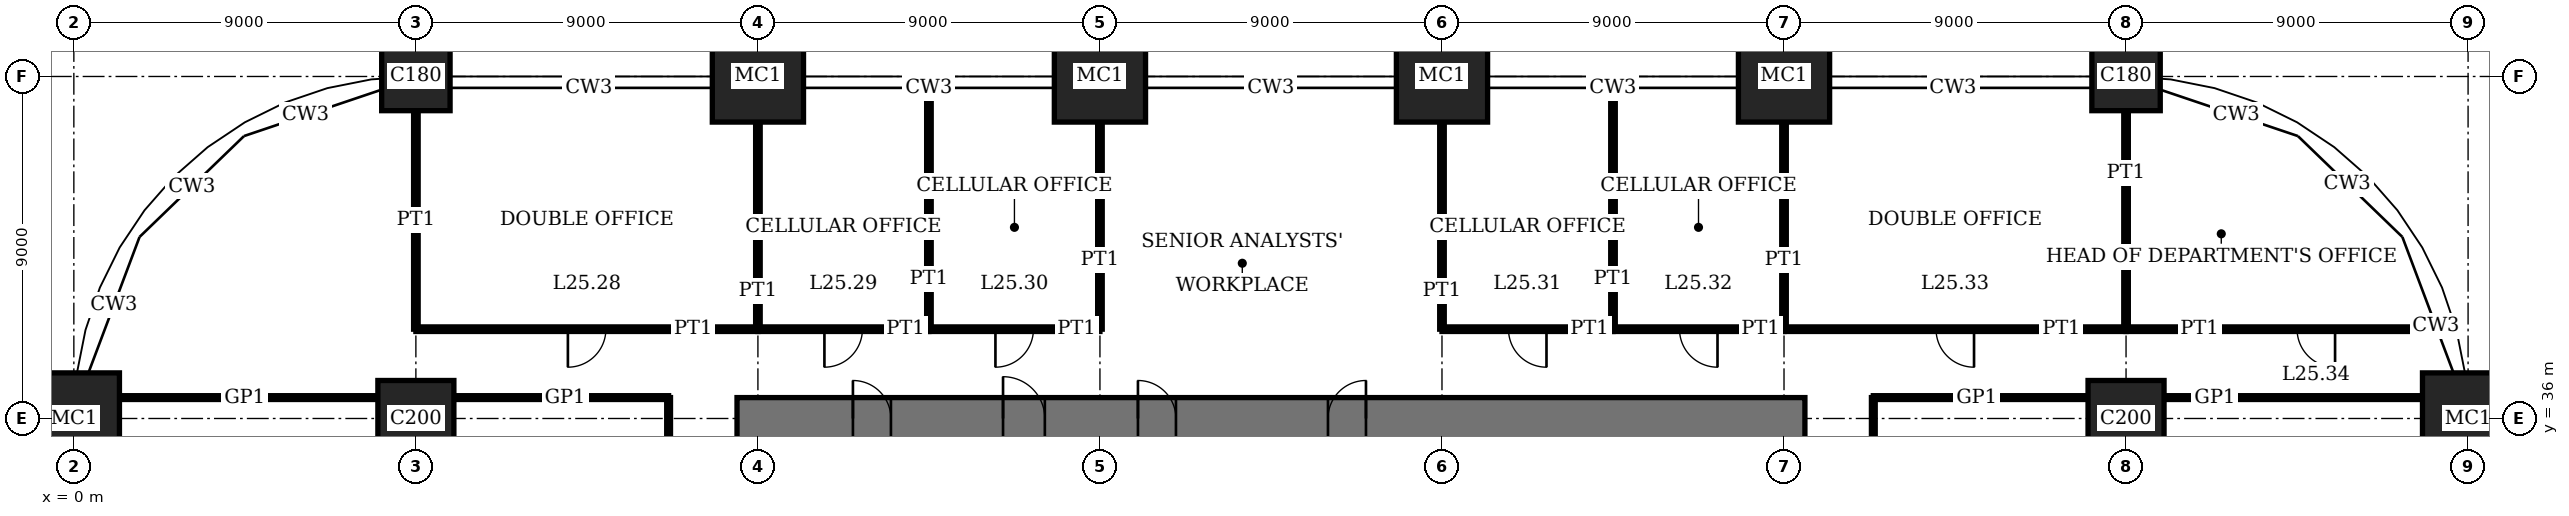
"""IFC4 building model, lengths in metres.
Left out: names, types, materials, properties, quantities, classifications, styles, units other than length and angle.
Written with IfcOpenShell. Run it as: python <this file> out.ifc"""

import sys

from ifc_helpers import new_model, si_unit, direction, frame, frame_2d, origin, origin_2d, place, context, subcontext, project, spatial, rectangle, extrude, element, fill, save


model = new_model("IFC4")
c1 = context("Model", 3, precision=1e-05, world=origin(), true_north=direction((0.0, 1.0)))
c2 = subcontext(c1, "Body", "Model", "MODEL_VIEW")
j1 = project(units=[si_unit("LENGTHUNIT", "METRE"), si_unit("PLANEANGLEUNIT", "RADIAN")], contexts=[c1])
p1 = place(None, origin())
s1 = spatial("IfcSite", under=j1, at=p1, CompositionType="ELEMENT")
p2 = place(p1, origin())
s2 = spatial("IfcBuilding", under=s1, at=p2, CompositionType="ELEMENT")
p3 = place(p2, frame((0.0, 0.0, 105.0)))
s3 = spatial("IfcBuildingStorey", under=s2, at=p3, CompositionType="ELEMENT", Elevation=105.0)
p4 = place(p3, frame((0.0, 36.0, 0.0), z_axis=(0.0, 0.0, 1.0), x_axis=(1.0, 0.0, 0.0)))
e1 = element("IfcColumn", 1, at=p4, inside=s3, PredefinedType="COLUMN", context=c2, shape_type="SweptSolid", body=[
    extrude(rectangle(XDim=2.4, YDim=2.4, at=origin_2d()), origin(), (0.0, 0.0, 1.0), 4.0),
])
p5 = place(p3, frame((9.0, 36.0, 0.0), z_axis=(0.0, 0.0, 1.0), x_axis=(1.0, 0.0, 0.0)))
e2 = element("IfcColumn", 2, at=p5, inside=s3, PredefinedType="COLUMN", context=c2, shape_type="SweptSolid", body=[
    extrude(rectangle(XDim=2.0, YDim=2.0, at=origin_2d()), origin(), (0.0, 0.0, 1.0), 4.0),
])
p6 = place(p3, frame((9.0, 45.0, 0.0), z_axis=(0.0, 0.0, 1.0), x_axis=(1.0, 0.0, 0.0)))
e3 = element("IfcColumn", 3, at=p6, inside=s3, PredefinedType="COLUMN", context=c2, shape_type="SweptSolid", body=[
    extrude(rectangle(XDim=1.8, YDim=1.8, at=origin_2d()), origin(), (0.0, 0.0, 1.0), 4.0),
])
for number, where, z_axis, x_axis in (
    (4, (18.0, 45.0, 0.0), (0.0, 0.0, 1.0), (1.0, 0.0, 0.0)),
    (5, (27.0, 45.0, 0.0), (0.0, 0.0, 1.0), (1.0, 0.0, 0.0)),
    (6, (36.0, 45.0, 0.0), (0.0, 0.0, 1.0), (1.0, 0.0, 0.0)),
    (7, (45.0, 45.0, 0.0), (0.0, 0.0, 1.0), (1.0, 0.0, 0.0)),
):
    element("IfcColumn", number, at=place(p3, frame(where, z_axis=z_axis, x_axis=x_axis)), inside=s3, PredefinedType="COLUMN", context=c2, shape_type="SweptSolid", body=[
        extrude(rectangle(XDim=2.4, YDim=2.4, at=origin_2d()), origin(), (0.0, 0.0, 1.0), 4.0),
    ])
p7 = place(p3, frame((54.0, 36.0, 0.0), z_axis=(0.0, 0.0, 1.0), x_axis=(1.0, 0.0, 0.0)))
e8 = element("IfcColumn", 8, at=p7, inside=s3, PredefinedType="COLUMN", context=c2, shape_type="SweptSolid", body=[
    extrude(rectangle(XDim=2.0, YDim=2.0, at=origin_2d()), origin(), (0.0, 0.0, 1.0), 4.0),
])
p8 = place(p3, frame((54.0, 45.0, 0.0), z_axis=(0.0, 0.0, 1.0), x_axis=(1.0, 0.0, 0.0)))
e9 = element("IfcColumn", 9, at=p8, inside=s3, PredefinedType="COLUMN", context=c2, shape_type="SweptSolid", body=[
    extrude(rectangle(XDim=1.8, YDim=1.8, at=origin_2d()), origin(), (0.0, 0.0, 1.0), 4.0),
])
p9 = place(p3, frame((63.0, 36.0, 0.0), z_axis=(0.0, 0.0, 1.0), x_axis=(1.0, 0.0, 0.0)))
e10 = element("IfcColumn", 10, at=p9, inside=s3, PredefinedType="COLUMN", context=c2, shape_type="SweptSolid", body=[
    extrude(rectangle(XDim=2.4, YDim=2.4, at=origin_2d()), origin(), (0.0, 0.0, 1.0), 4.0),
])
p10 = place(p3, frame((45.55, 36.0, 0.0), z_axis=(0.0, 0.0, 1.0), x_axis=(-1.0, 0.0, 0.0)))
e11 = element("IfcWall", 11, at=p10, inside=s3, PredefinedType="SHEAR", context=c2, shape_type="SweptSolid", body=[
    extrude(rectangle(XDim=28.1, YDim=1.1, at=frame_2d((14.05, 0.0))), origin(), (0.0, 0.0, 1.0), 4.0),
])
p11 = place(p10, frame((11.55, 0.0, 0.0)))
e12 = element("IfcOpeningElement", 12, at=p11, cuts=e11, PredefinedType="OPENING", context=c2, shape_type="SweptSolid", body=[
    extrude(rectangle(XDim=1.0, YDim=2.4, at=frame_2d((0.5, 1.2))), frame((0.0, 0.56, 0.0), z_axis=(0.0, -1.0, 0.0), x_axis=(1.0, 0.0, 0.0)), (0.0, 0.0, 1.0), 1.12),
])
p12 = place(p10, frame((16.55, 0.0, 0.0)))
e13 = element("IfcOpeningElement", 13, at=p12, cuts=e11, PredefinedType="OPENING", context=c2, shape_type="SweptSolid", body=[
    extrude(rectangle(XDim=1.0, YDim=2.4, at=frame_2d((0.5, 1.2))), frame((0.0, 0.56, 0.0), z_axis=(0.0, -1.0, 0.0), x_axis=(1.0, 0.0, 0.0)), (0.0, 0.0, 1.0), 1.12),
])
p13 = place(p10, frame((20.0, 0.0, 0.0)))
e14 = element("IfcOpeningElement", 14, at=p13, cuts=e11, PredefinedType="OPENING", context=c2, shape_type="SweptSolid", body=[
    extrude(rectangle(XDim=1.1, YDim=2.4, at=frame_2d((0.55, 1.2))), frame((0.0, 0.56, 0.0), z_axis=(0.0, -1.0, 0.0), x_axis=(1.0, 0.0, 0.0)), (0.0, 0.0, 1.0), 1.12),
])
p14 = place(p10, frame((24.05, 0.0, 0.0)))
e15 = element("IfcOpeningElement", 15, at=p14, cuts=e11, PredefinedType="OPENING", context=c2, shape_type="SweptSolid", body=[
    extrude(rectangle(XDim=1.0, YDim=2.4, at=frame_2d((0.5, 1.2))), frame((0.0, 0.56, 0.0), z_axis=(0.0, -1.0, 0.0), x_axis=(1.0, 0.0, 0.0)), (0.0, 0.0, 1.0), 1.12),
])
p15 = place(p3, frame((1.2, 36.55, 0.0), z_axis=(0.0, 0.0, 1.0), x_axis=(1.0, 0.0, 0.0)))
e16 = element("IfcWall", 16, at=p15, inside=s3, PredefinedType="PARTITIONING", context=c2, shape_type="SweptSolid", body=[
    extrude(rectangle(XDim=6.8, YDim=0.1, at=frame_2d((3.4, 0.0))), origin(), (0.0, 0.0, 1.0), 3.75),
])
for number, where, z_axis, x_axis in (
    (17, (10.0, 36.55, 0.0), (0.0, 0.0, 1.0), (1.0, 0.0, 0.0)),
    (18, (47.35, 36.55, 0.0), (0.0, 0.0, 1.0), (1.0, 0.0, 0.0)),
):
    element("IfcWall", number, at=place(p3, frame(where, z_axis=z_axis, x_axis=x_axis)), inside=s3, PredefinedType="PARTITIONING", context=c2, shape_type="SweptSolid", body=[
        extrude(rectangle(XDim=5.65, YDim=0.1, at=frame_2d((2.825, 0.0))), origin(), (0.0, 0.0, 1.0), 3.75),
    ])
p16 = place(p3, frame((55.0, 36.55, 0.0), z_axis=(0.0, 0.0, 1.0), x_axis=(1.0, 0.0, 0.0)))
e19 = element("IfcWall", 19, at=p16, inside=s3, PredefinedType="PARTITIONING", context=c2, shape_type="SweptSolid", body=[
    extrude(rectangle(XDim=6.8, YDim=0.1, at=frame_2d((3.4, 0.0))), origin(), (0.0, 0.0, 1.0), 3.75),
])
p17 = place(p3, frame((9.0, 38.35, 0.0), z_axis=(0.0, 0.0, 1.0), x_axis=(1.0, 0.0, 0.0)))
e20 = element("IfcWall", 20, at=p17, inside=s3, PredefinedType="PARTITIONING", context=c2, shape_type="SweptSolid", body=[
    extrude(rectangle(XDim=9.0, YDim=0.12, at=frame_2d((4.5, 0.0))), origin(), (0.0, 0.0, 1.0), 3.75),
])
p18 = place(p17, frame((4.0, 0.0, 0.0)))
e21 = element("IfcOpeningElement", 21, at=p18, cuts=e20, PredefinedType="OPENING", context=c2, shape_type="SweptSolid", body=[
    extrude(rectangle(XDim=1.0, YDim=2.4, at=frame_2d((0.5, 1.2))), frame((0.0, 0.07, 0.0), z_axis=(0.0, -1.0, 0.0), x_axis=(1.0, 0.0, 0.0)), (0.0, 0.0, 1.0), 0.14),
])
p19 = place(p3, frame((18.0, 38.35, 0.0), z_axis=(0.0, 0.0, 1.0), x_axis=(1.0, 0.0, 0.0)))
e22 = element("IfcWall", 22, at=p19, inside=s3, PredefinedType="PARTITIONING", context=c2, shape_type="SweptSolid", body=[
    extrude(rectangle(XDim=4.5, YDim=0.12, at=frame_2d((2.25, 0.0))), origin(), (0.0, 0.0, 1.0), 3.75),
])
p20 = place(p19, frame((1.75, 0.0, 0.0)))
e23 = element("IfcOpeningElement", 23, at=p20, cuts=e22, PredefinedType="OPENING", context=c2, shape_type="SweptSolid", body=[
    extrude(rectangle(XDim=1.0, YDim=2.4, at=frame_2d((0.5, 1.2))), frame((0.0, 0.07, 0.0), z_axis=(0.0, -1.0, 0.0), x_axis=(1.0, 0.0, 0.0)), (0.0, 0.0, 1.0), 0.14),
])
p21 = place(p3, frame((22.5, 38.35, 0.0), z_axis=(0.0, 0.0, 1.0), x_axis=(1.0, 0.0, 0.0)))
e24 = element("IfcWall", 24, at=p21, inside=s3, PredefinedType="PARTITIONING", context=c2, shape_type="SweptSolid", body=[
    extrude(rectangle(XDim=4.5, YDim=0.12, at=frame_2d((2.25, 0.0))), origin(), (0.0, 0.0, 1.0), 3.75),
])
p22 = place(p21, frame((1.75, 0.0, 0.0)))
e25 = element("IfcOpeningElement", 25, at=p22, cuts=e24, PredefinedType="OPENING", context=c2, shape_type="SweptSolid", body=[
    extrude(rectangle(XDim=1.0, YDim=2.4, at=frame_2d((0.5, 1.2))), frame((0.0, 0.07, 0.0), z_axis=(0.0, -1.0, 0.0), x_axis=(1.0, 0.0, 0.0)), (0.0, 0.0, 1.0), 0.14),
])
p23 = place(p3, frame((36.0, 38.35, 0.0), z_axis=(0.0, 0.0, 1.0), x_axis=(1.0, 0.0, 0.0)))
e26 = element("IfcWall", 26, at=p23, inside=s3, PredefinedType="PARTITIONING", context=c2, shape_type="SweptSolid", body=[
    extrude(rectangle(XDim=4.5, YDim=0.12, at=frame_2d((2.25, 0.0))), origin(), (0.0, 0.0, 1.0), 3.75),
])
p24 = place(p23, frame((1.75, 0.0, 0.0)))
e27 = element("IfcOpeningElement", 27, at=p24, cuts=e26, PredefinedType="OPENING", context=c2, shape_type="SweptSolid", body=[
    extrude(rectangle(XDim=1.0, YDim=2.4, at=frame_2d((0.5, 1.2))), frame((0.0, 0.07, 0.0), z_axis=(0.0, -1.0, 0.0), x_axis=(1.0, 0.0, 0.0)), (0.0, 0.0, 1.0), 0.14),
])
p25 = place(p3, frame((40.5, 38.35, 0.0), z_axis=(0.0, 0.0, 1.0), x_axis=(1.0, 0.0, 0.0)))
e28 = element("IfcWall", 28, at=p25, inside=s3, PredefinedType="PARTITIONING", context=c2, shape_type="SweptSolid", body=[
    extrude(rectangle(XDim=4.5, YDim=0.12, at=frame_2d((2.25, 0.0))), origin(), (0.0, 0.0, 1.0), 3.75),
])
p26 = place(p25, frame((1.75, 0.0, 0.0)))
e29 = element("IfcOpeningElement", 29, at=p26, cuts=e28, PredefinedType="OPENING", context=c2, shape_type="SweptSolid", body=[
    extrude(rectangle(XDim=1.0, YDim=2.4, at=frame_2d((0.5, 1.2))), frame((0.0, 0.07, 0.0), z_axis=(0.0, -1.0, 0.0), x_axis=(1.0, 0.0, 0.0)), (0.0, 0.0, 1.0), 0.14),
])
p27 = place(p3, frame((45.0, 38.35, 0.0), z_axis=(0.0, 0.0, 1.0), x_axis=(1.0, 0.0, 0.0)))
e30 = element("IfcWall", 30, at=p27, inside=s3, PredefinedType="PARTITIONING", context=c2, shape_type="SweptSolid", body=[
    extrude(rectangle(XDim=9.0, YDim=0.12, at=frame_2d((4.5, 0.0))), origin(), (0.0, 0.0, 1.0), 3.75),
])
p28 = place(p27, frame((4.0, 0.0, 0.0)))
e31 = element("IfcOpeningElement", 31, at=p28, cuts=e30, PredefinedType="OPENING", context=c2, shape_type="SweptSolid", body=[
    extrude(rectangle(XDim=1.0, YDim=2.4, at=frame_2d((0.5, 1.2))), frame((0.0, 0.07, 0.0), z_axis=(0.0, -1.0, 0.0), x_axis=(1.0, 0.0, 0.0)), (0.0, 0.0, 1.0), 0.14),
])
p29 = place(p3, frame((54.0, 38.35, 0.0), z_axis=(0.0, 0.0, 1.0), x_axis=(1.0, 0.0, 0.0)))
e32 = element("IfcWall", 32, at=p29, inside=s3, PredefinedType="PARTITIONING", context=c2, shape_type="SweptSolid", body=[
    extrude(rectangle(XDim=8.145, YDim=0.12, at=frame_2d((4.072, 0.0))), origin(), (0.0, 0.0, 1.0), 3.75),
])
p30 = place(p29, frame((4.5, 0.0, 0.0)))
e33 = element("IfcOpeningElement", 33, at=p30, cuts=e32, PredefinedType="OPENING", context=c2, shape_type="SweptSolid", body=[
    extrude(rectangle(XDim=1.0, YDim=2.4, at=frame_2d((0.5, 1.2))), frame((0.0, 0.07, 0.0), z_axis=(0.0, -1.0, 0.0), x_axis=(1.0, 0.0, 0.0)), (0.0, 0.0, 1.0), 0.14),
])
p31 = place(p3, frame((9.0, 38.35, 0.0), z_axis=(0.0, 0.0, 1.0), x_axis=(0.0, 1.0, 0.0)))
e34 = element("IfcWall", 34, at=p31, inside=s3, PredefinedType="PARTITIONING", context=c2, shape_type="SweptSolid", body=[
    extrude(rectangle(XDim=5.75, YDim=0.12, at=frame_2d((2.875, 0.0))), origin(), (0.0, 0.0, 1.0), 3.05),
])
p32 = place(p3, frame((15.65, 27.0, 0.0), z_axis=(0.0, 0.0, 1.0), x_axis=(0.0, 1.0, 0.0)))
e35 = element("IfcWall", 35, at=p32, inside=s3, PredefinedType="PARTITIONING", context=c2, shape_type="SweptSolid", body=[
    extrude(rectangle(XDim=9.55, YDim=0.1, at=frame_2d((4.775, 0.0))), origin(), (0.0, 0.0, 1.0), 3.75),
])
p33 = place(p32, frame((4.275, 0.0, 0.0)))
e36 = element("IfcOpeningElement", 36, at=p33, cuts=e35, PredefinedType="OPENING", context=c2, shape_type="SweptSolid", body=[
    extrude(rectangle(XDim=1.0, YDim=2.4, at=frame_2d((0.5, 1.2))), frame((0.0, 0.06, 0.0), z_axis=(0.0, -1.0, 0.0), x_axis=(1.0, 0.0, 0.0)), (0.0, 0.0, 1.0), 0.12),
])
p34 = place(p3, frame((18.0, 38.35, 0.0), z_axis=(0.0, 0.0, 1.0), x_axis=(0.0, 1.0, 0.0)))
e37 = element("IfcWall", 37, at=p34, inside=s3, PredefinedType="PARTITIONING", context=c2, shape_type="SweptSolid", body=[
    extrude(rectangle(XDim=5.45, YDim=0.12, at=frame_2d((2.725, 0.0))), origin(), (0.0, 0.0, 1.0), 3.05),
])
p35 = place(p3, frame((22.5, 38.35, 0.0), z_axis=(0.0, 0.0, 1.0), x_axis=(0.0, 1.0, 0.0)))
e38 = element("IfcWall", 38, at=p35, inside=s3, PredefinedType="PARTITIONING", context=c2, shape_type="SweptSolid", body=[
    extrude(rectangle(XDim=6.34, YDim=0.12, at=frame_2d((3.17, 0.0))), origin(), (0.0, 0.0, 1.0), 3.75),
])
for number, where, z_axis, x_axis in (
    (39, (27.0, 38.35, 0.0), (0.0, 0.0, 1.0), (0.0, 1.0, 0.0)),
    (40, (36.0, 38.35, 0.0), (0.0, 0.0, 1.0), (0.0, 1.0, 0.0)),
):
    element("IfcWall", number, at=place(p3, frame(where, z_axis=z_axis, x_axis=x_axis)), inside=s3, PredefinedType="PARTITIONING", context=c2, shape_type="SweptSolid", body=[
        extrude(rectangle(XDim=5.45, YDim=0.12, at=frame_2d((2.725, 0.0))), origin(), (0.0, 0.0, 1.0), 3.05),
    ])
p36 = place(p3, frame((40.5, 38.35, 0.0), z_axis=(0.0, 0.0, 1.0), x_axis=(0.0, 1.0, 0.0)))
e41 = element("IfcWall", 41, at=p36, inside=s3, PredefinedType="PARTITIONING", context=c2, shape_type="SweptSolid", body=[
    extrude(rectangle(XDim=6.34, YDim=0.12, at=frame_2d((3.17, 0.0))), origin(), (0.0, 0.0, 1.0), 3.75),
])
p37 = place(p3, frame((45.0, 38.35, 0.0), z_axis=(0.0, 0.0, 1.0), x_axis=(0.0, 1.0, 0.0)))
e42 = element("IfcWall", 42, at=p37, inside=s3, PredefinedType="PARTITIONING", context=c2, shape_type="SweptSolid", body=[
    extrude(rectangle(XDim=5.45, YDim=0.12, at=frame_2d((2.725, 0.0))), origin(), (0.0, 0.0, 1.0), 3.05),
])
p38 = place(p3, frame((47.35, 31.5, 0.0), z_axis=(0.0, 0.0, 1.0), x_axis=(0.0, 1.0, 0.0)))
e43 = element("IfcWall", 43, at=p38, inside=s3, PredefinedType="PARTITIONING", context=c2, shape_type="SweptSolid", body=[
    extrude(rectangle(XDim=5.05, YDim=0.1, at=frame_2d((2.525, 0.0))), origin(), (0.0, 0.0, 1.0), 3.75),
])
p39 = place(p3, frame((54.0, 38.35, 0.0), z_axis=(0.0, 0.0, 1.0), x_axis=(0.0, 1.0, 0.0)))
e44 = element("IfcWall", 44, at=p39, inside=s3, PredefinedType="PARTITIONING", context=c2, shape_type="SweptSolid", body=[
    extrude(rectangle(XDim=5.75, YDim=0.12, at=frame_2d((2.875, 0.0))), origin(), (0.0, 0.0, 1.0), 3.05),
])
p40 = place(p11, origin())
e45 = element("IfcDoor", 45, at=p40, inside=s3, OperationType="SINGLE_SWING_LEFT", PredefinedType="DOOR", context=c2, shape_type="SweptSolid", body=[
    extrude(rectangle(XDim=1.0, YDim=2.4, at=frame_2d((0.5, 1.2))), frame((0.0, 0.025, 0.0), z_axis=(0.0, -1.0, 0.0), x_axis=(1.0, 0.0, 0.0)), (0.0, 0.0, 1.0), 0.05),
    extrude(rectangle(XDim=0.04, YDim=2.4, at=frame_2d((0.02, 1.2))), frame((0.0, 0.4, 0.0), z_axis=(0.0, -1.0, 0.0), x_axis=(1.0, 0.0, 0.0)), (0.0, 0.0, 1.0), 0.8),
    extrude(rectangle(XDim=0.04, YDim=2.4, at=frame_2d((0.98, 1.2))), frame((0.0, 0.4, 0.0), z_axis=(0.0, -1.0, 0.0), x_axis=(1.0, 0.0, 0.0)), (0.0, 0.0, 1.0), 0.8),
    extrude(rectangle(XDim=1.0, YDim=0.04, at=frame_2d((0.5, 2.38))), frame((0.0, 0.4, 0.0), z_axis=(0.0, -1.0, 0.0), x_axis=(1.0, 0.0, 0.0)), (0.0, 0.0, 1.0), 0.8),
])
fill(e12, e45)
p41 = place(p12, origin())
e46 = element("IfcDoor", 46, at=p41, inside=s3, OperationType="SINGLE_SWING_RIGHT", PredefinedType="DOOR", context=c2, shape_type="SweptSolid", body=[
    extrude(rectangle(XDim=1.0, YDim=2.4, at=frame_2d((0.5, 1.2))), frame((0.0, 0.025, 0.0), z_axis=(0.0, -1.0, 0.0), x_axis=(1.0, 0.0, 0.0)), (0.0, 0.0, 1.0), 0.05),
    extrude(rectangle(XDim=0.04, YDim=2.4, at=frame_2d((0.02, 1.2))), frame((0.0, 0.4, 0.0), z_axis=(0.0, -1.0, 0.0), x_axis=(1.0, 0.0, 0.0)), (0.0, 0.0, 1.0), 0.8),
    extrude(rectangle(XDim=0.04, YDim=2.4, at=frame_2d((0.98, 1.2))), frame((0.0, 0.4, 0.0), z_axis=(0.0, -1.0, 0.0), x_axis=(1.0, 0.0, 0.0)), (0.0, 0.0, 1.0), 0.8),
    extrude(rectangle(XDim=1.0, YDim=0.04, at=frame_2d((0.5, 2.38))), frame((0.0, 0.4, 0.0), z_axis=(0.0, -1.0, 0.0), x_axis=(1.0, 0.0, 0.0)), (0.0, 0.0, 1.0), 0.8),
])
fill(e13, e46)
p42 = place(p13, origin())
e47 = element("IfcDoor", 47, at=p42, inside=s3, OperationType="SINGLE_SWING_RIGHT", PredefinedType="DOOR", context=c2, shape_type="SweptSolid", body=[
    extrude(rectangle(XDim=1.1, YDim=2.4, at=frame_2d((0.55, 1.2))), frame((0.0, 0.025, 0.0), z_axis=(0.0, -1.0, 0.0), x_axis=(1.0, 0.0, 0.0)), (0.0, 0.0, 1.0), 0.05),
    extrude(rectangle(XDim=0.04, YDim=2.4, at=frame_2d((0.02, 1.2))), frame((0.0, 0.44, 0.0), z_axis=(0.0, -1.0, 0.0), x_axis=(1.0, 0.0, 0.0)), (0.0, 0.0, 1.0), 0.88),
    extrude(rectangle(XDim=0.04, YDim=2.4, at=frame_2d((1.08, 1.2))), frame((0.0, 0.44, 0.0), z_axis=(0.0, -1.0, 0.0), x_axis=(1.0, 0.0, 0.0)), (0.0, 0.0, 1.0), 0.88),
    extrude(rectangle(XDim=1.1, YDim=0.04, at=frame_2d((0.55, 2.38))), frame((0.0, 0.44, 0.0), z_axis=(0.0, -1.0, 0.0), x_axis=(1.0, 0.0, 0.0)), (0.0, 0.0, 1.0), 0.88),
])
fill(e14, e47)
p43 = place(p14, origin())
e48 = element("IfcDoor", 48, at=p43, inside=s3, OperationType="SINGLE_SWING_RIGHT", PredefinedType="DOOR", context=c2, shape_type="SweptSolid", body=[
    extrude(rectangle(XDim=1.0, YDim=2.4, at=frame_2d((0.5, 1.2))), frame((0.0, 0.025, 0.0), z_axis=(0.0, -1.0, 0.0), x_axis=(1.0, 0.0, 0.0)), (0.0, 0.0, 1.0), 0.05),
    extrude(rectangle(XDim=0.04, YDim=2.4, at=frame_2d((0.02, 1.2))), frame((0.0, 0.4, 0.0), z_axis=(0.0, -1.0, 0.0), x_axis=(1.0, 0.0, 0.0)), (0.0, 0.0, 1.0), 0.8),
    extrude(rectangle(XDim=0.04, YDim=2.4, at=frame_2d((0.98, 1.2))), frame((0.0, 0.4, 0.0), z_axis=(0.0, -1.0, 0.0), x_axis=(1.0, 0.0, 0.0)), (0.0, 0.0, 1.0), 0.8),
    extrude(rectangle(XDim=1.0, YDim=0.04, at=frame_2d((0.5, 2.38))), frame((0.0, 0.4, 0.0), z_axis=(0.0, -1.0, 0.0), x_axis=(1.0, 0.0, 0.0)), (0.0, 0.0, 1.0), 0.8),
])
fill(e15, e48)
p44 = place(p18, origin())
e49 = element("IfcDoor", 49, at=p44, inside=s3, OperationType="SINGLE_SWING_LEFT", PredefinedType="DOOR", context=c2, shape_type="SweptSolid", body=[
    extrude(rectangle(XDim=1.0, YDim=2.4, at=frame_2d((0.5, 1.2))), frame((0.0, 0.025, 0.0), z_axis=(0.0, -1.0, 0.0), x_axis=(1.0, 0.0, 0.0)), (0.0, 0.0, 1.0), 0.05),
])
fill(e21, e49)
p45 = place(p20, origin())
e50 = element("IfcDoor", 50, at=p45, inside=s3, OperationType="SINGLE_SWING_LEFT", PredefinedType="DOOR", context=c2, shape_type="SweptSolid", body=[
    extrude(rectangle(XDim=1.0, YDim=2.4, at=frame_2d((0.5, 1.2))), frame((0.0, 0.025, 0.0), z_axis=(0.0, -1.0, 0.0), x_axis=(1.0, 0.0, 0.0)), (0.0, 0.0, 1.0), 0.05),
])
fill(e23, e50)
p46 = place(p22, origin())
e51 = element("IfcDoor", 51, at=p46, inside=s3, OperationType="SINGLE_SWING_LEFT", PredefinedType="DOOR", context=c2, shape_type="SweptSolid", body=[
    extrude(rectangle(XDim=1.0, YDim=2.4, at=frame_2d((0.5, 1.2))), frame((0.0, 0.025, 0.0), z_axis=(0.0, -1.0, 0.0), x_axis=(1.0, 0.0, 0.0)), (0.0, 0.0, 1.0), 0.05),
])
fill(e25, e51)
p47 = place(p24, origin())
e52 = element("IfcDoor", 52, at=p47, inside=s3, OperationType="SINGLE_SWING_RIGHT", PredefinedType="DOOR", context=c2, shape_type="SweptSolid", body=[
    extrude(rectangle(XDim=1.0, YDim=2.4, at=frame_2d((0.5, 1.2))), frame((0.0, 0.025, 0.0), z_axis=(0.0, -1.0, 0.0), x_axis=(1.0, 0.0, 0.0)), (0.0, 0.0, 1.0), 0.05),
])
fill(e27, e52)
p48 = place(p26, origin())
e53 = element("IfcDoor", 53, at=p48, inside=s3, OperationType="SINGLE_SWING_RIGHT", PredefinedType="DOOR", context=c2, shape_type="SweptSolid", body=[
    extrude(rectangle(XDim=1.0, YDim=2.4, at=frame_2d((0.5, 1.2))), frame((0.0, 0.025, 0.0), z_axis=(0.0, -1.0, 0.0), x_axis=(1.0, 0.0, 0.0)), (0.0, 0.0, 1.0), 0.05),
])
fill(e29, e53)
p49 = place(p28, origin())
e54 = element("IfcDoor", 54, at=p49, inside=s3, OperationType="SINGLE_SWING_RIGHT", PredefinedType="DOOR", context=c2, shape_type="SweptSolid", body=[
    extrude(rectangle(XDim=1.0, YDim=2.4, at=frame_2d((0.5, 1.2))), frame((0.0, 0.025, 0.0), z_axis=(0.0, -1.0, 0.0), x_axis=(1.0, 0.0, 0.0)), (0.0, 0.0, 1.0), 0.05),
])
fill(e31, e54)
p50 = place(p30, origin())
e55 = element("IfcDoor", 55, at=p50, inside=s3, OperationType="SINGLE_SWING_RIGHT", PredefinedType="DOOR", context=c2, shape_type="SweptSolid", body=[
    extrude(rectangle(XDim=1.0, YDim=2.4, at=frame_2d((0.5, 1.2))), frame((0.0, 0.025, 0.0), z_axis=(0.0, -1.0, 0.0), x_axis=(1.0, 0.0, 0.0)), (0.0, 0.0, 1.0), 0.05),
])
fill(e33, e55)
save(model, sys.argv[1])
